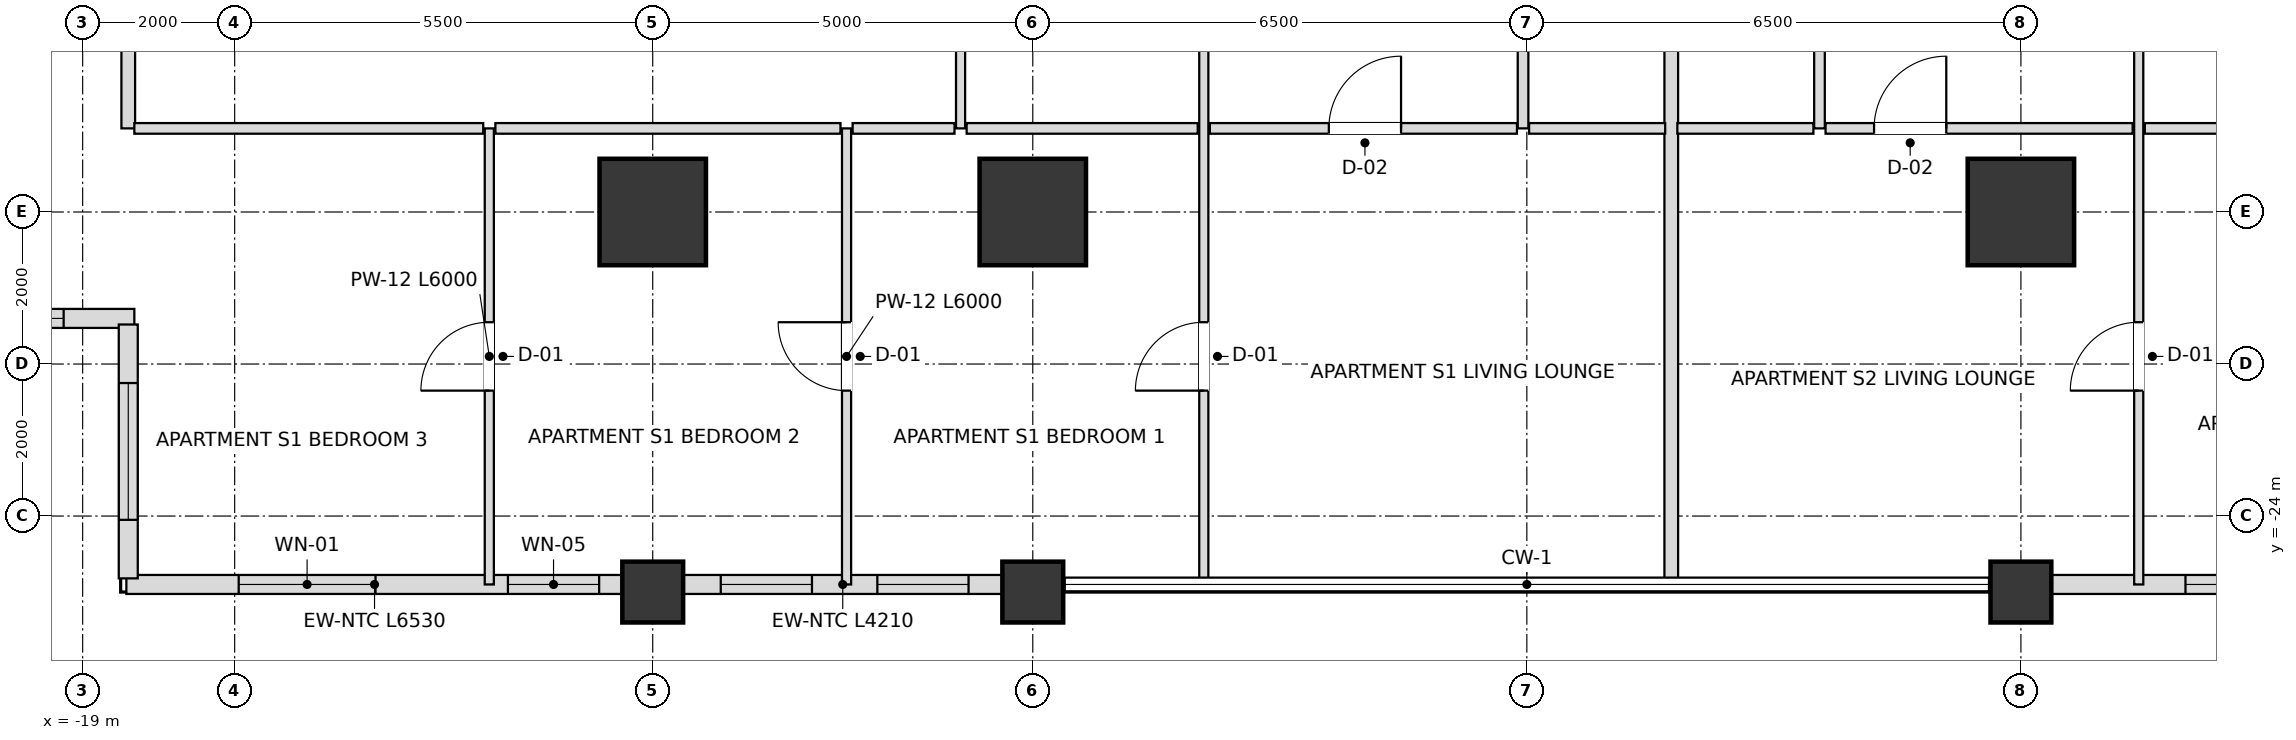
"""IFC4 building model, lengths in metres.
Left out: names, types, materials, properties, quantities, classifications, styles, units other than length and angle.
Written with IfcOpenShell. Run it as: python <this file> out.ifc"""

import sys

from ifc_helpers import new_model, si_unit, direction, frame, frame_2d, origin, origin_2d, place, context, subcontext, project, spatial, rectangle, extrude, element, fill, save


model = new_model("IFC4")
c1 = context("Model", 3, precision=1e-05, world=origin(), true_north=direction((0.0, 1.0)))
c2 = subcontext(c1, "Body", "Model", "MODEL_VIEW")
j1 = project(units=[si_unit("LENGTHUNIT", "METRE"), si_unit("PLANEANGLEUNIT", "RADIAN")], contexts=[c1])
p1 = place(None, origin())
s1 = spatial("IfcSite", under=j1, at=p1, CompositionType="ELEMENT")
p2 = place(p1, origin())
s2 = spatial("IfcBuilding", under=s1, at=p2, CompositionType="ELEMENT")
p3 = place(p2, frame((0.0, 0.0, 36.0)))
s3 = spatial("IfcBuildingStorey", under=s2, at=p3, CompositionType="ELEMENT", Elevation=36.0)
for number, where, z_axis, x_axis in (
    (1, (-11.5, -20.0, 0.0), (0.0, 0.0, 1.0), (1.0, 0.0, 0.0)),
    (2, (-6.5, -20.0, 0.0), (0.0, 0.0, 1.0), (1.0, 0.0, 0.0)),
    (3, (6.5, -20.0, 0.0), (0.0, 0.0, 1.0), (1.0, 0.0, 0.0)),
):
    element("IfcColumn", number, at=place(p3, frame(where, z_axis=z_axis, x_axis=x_axis)), inside=s3, PredefinedType="USERDEFINED", context=c2, shape_type="SweptSolid", body=[
        extrude(rectangle(XDim=1.4, YDim=1.4, at=origin_2d()), origin(), (0.0, 0.0, 1.0), 3.6),
    ])
for number, where, z_axis, x_axis in (
    (4, (-11.5, -25.0, 0.0), (0.0, 0.0, 1.0), (1.0, 0.0, 0.0)),
    (5, (-6.5, -25.0, 0.0), (0.0, 0.0, 1.0), (1.0, 0.0, 0.0)),
    (6, (6.5, -25.0, 0.0), (0.0, 0.0, 1.0), (1.0, 0.0, 0.0)),
):
    element("IfcColumn", number, at=place(p3, frame(where, z_axis=z_axis, x_axis=x_axis)), inside=s3, PredefinedType="COLUMN", context=c2, shape_type="SweptSolid", body=[
        extrude(rectangle(XDim=0.8, YDim=0.8, at=origin_2d()), origin(), (0.0, 0.0, 1.0), 3.6),
    ])
p4 = place(p3, frame((-18.425, -24.9, 0.0), z_axis=(0.0, 0.0, 1.0), x_axis=(1.0, 0.0, 0.0)))
e7 = element("IfcWall", 7, at=p4, inside=s3, PredefinedType="SOLIDWALL", context=c2, shape_type="SweptSolid", body=[
    extrude(rectangle(XDim=6.53, YDim=0.25, at=frame_2d((3.265, 0.0))), origin(), (0.0, 0.0, 1.0), 2.736),
])
p5 = place(p4, frame((1.478, 0.0, 0.72)))
e8 = element("IfcOpeningElement", 8, at=p5, cuts=e7, PredefinedType="OPENING", context=c2, shape_type="SweptSolid", body=[
    extrude(rectangle(XDim=1.8, YDim=1.68, at=frame_2d((0.9, 0.84))), frame((0.0, 0.135, 0.0), z_axis=(0.0, -1.0, 0.0), x_axis=(1.0, 0.0, 0.0)), (0.0, 0.0, 1.0), 0.27),
])
p6 = place(p4, frame((5.02, 0.0, 0.72)))
e9 = element("IfcOpeningElement", 9, at=p6, cuts=e7, PredefinedType="OPENING", context=c2, shape_type="SweptSolid", body=[
    extrude(rectangle(XDim=1.2, YDim=1.68, at=frame_2d((0.6, 0.84))), frame((0.0, 0.135, 0.0), z_axis=(0.0, -1.0, 0.0), x_axis=(1.0, 0.0, 0.0)), (0.0, 0.0, 1.0), 0.27),
])
p7 = place(p3, frame((-11.105, -24.9, 0.0), z_axis=(0.0, 0.0, 1.0), x_axis=(1.0, 0.0, 0.0)))
e10 = element("IfcWall", 10, at=p7, inside=s3, PredefinedType="SOLIDWALL", context=c2, shape_type="SweptSolid", body=[
    extrude(rectangle(XDim=4.21, YDim=0.25, at=frame_2d((2.105, 0.0))), origin(), (0.0, 0.0, 1.0), 2.736),
])
p8 = place(p7, frame((0.5, 0.0, 0.72)))
e11 = element("IfcOpeningElement", 11, at=p8, cuts=e10, PredefinedType="OPENING", context=c2, shape_type="SweptSolid", body=[
    extrude(rectangle(XDim=1.2, YDim=1.68, at=frame_2d((0.6, 0.84))), frame((0.0, 0.135, 0.0), z_axis=(0.0, -1.0, 0.0), x_axis=(1.0, 0.0, 0.0)), (0.0, 0.0, 1.0), 0.27),
])
p9 = place(p7, frame((2.56, 0.0, 0.72)))
e12 = element("IfcOpeningElement", 12, at=p9, cuts=e10, PredefinedType="OPENING", context=c2, shape_type="SweptSolid", body=[
    extrude(rectangle(XDim=1.2, YDim=1.68, at=frame_2d((0.6, 0.84))), frame((0.0, 0.135, 0.0), z_axis=(0.0, -1.0, 0.0), x_axis=(1.0, 0.0, 0.0)), (0.0, 0.0, 1.0), 0.27),
])
p10 = place(p3, frame((6.895, -24.9, 0.0), z_axis=(0.0, 0.0, 1.0), x_axis=(1.0, 0.0, 0.0)))
e13 = element("IfcWall", 13, at=p10, inside=s3, PredefinedType="SOLIDWALL", context=c2, shape_type="SweptSolid", body=[
    extrude(rectangle(XDim=4.21, YDim=0.25, at=frame_2d((2.105, 0.0))), origin(), (0.0, 0.0, 1.0), 2.736),
])
p11 = place(p10, frame((1.77, 0.0, 0.72)))
e14 = element("IfcOpeningElement", 14, at=p11, cuts=e13, PredefinedType="OPENING", context=c2, shape_type="SweptSolid", body=[
    extrude(rectangle(XDim=1.8, YDim=1.68, at=frame_2d((0.9, 0.84))), frame((0.0, 0.135, 0.0), z_axis=(0.0, -1.0, 0.0), x_axis=(1.0, 0.0, 0.0)), (0.0, 0.0, 1.0), 0.27),
])
p12 = place(p3, frame((-21.98, -21.4, 0.0), z_axis=(0.0, 0.0, 1.0), x_axis=(1.0, 0.0, 0.0)))
e15 = element("IfcWall", 15, at=p12, inside=s3, PredefinedType="SOLIDWALL", context=c2, shape_type="SweptSolid", body=[
    extrude(rectangle(XDim=3.66, YDim=0.25, at=frame_2d((1.83, 0.0))), origin(), (0.0, 0.0, 1.0), 2.736),
])
p13 = place(p12, frame((0.93, 0.0, 0.72)))
e16 = element("IfcOpeningElement", 16, at=p13, cuts=e15, PredefinedType="OPENING", context=c2, shape_type="SweptSolid", body=[
    extrude(rectangle(XDim=1.8, YDim=1.68, at=frame_2d((0.9, 0.84))), frame((0.0, 0.135, 0.0), z_axis=(0.0, -1.0, 0.0), x_axis=(1.0, 0.0, 0.0)), (0.0, 0.0, 1.0), 0.27),
])
p14 = place(p3, frame((-18.4, -21.48, 0.0), z_axis=(0.0, 0.0, 1.0), x_axis=(0.0, -1.0, 0.0)))
e17 = element("IfcWall", 17, at=p14, inside=s3, PredefinedType="SOLIDWALL", context=c2, shape_type="SweptSolid", body=[
    extrude(rectangle(XDim=3.34, YDim=0.25, at=frame_2d((1.67, 0.0))), origin(), (0.0, 0.0, 1.0), 2.736),
])
p15 = place(p14, frame((0.77, 0.0, 0.72)))
e18 = element("IfcOpeningElement", 18, at=p15, cuts=e17, PredefinedType="OPENING", context=c2, shape_type="SweptSolid", body=[
    extrude(rectangle(XDim=1.8, YDim=1.68, at=frame_2d((0.9, 0.84))), frame((0.0, 0.135, 0.0), z_axis=(0.0, -1.0, 0.0), x_axis=(1.0, 0.0, 0.0)), (0.0, 0.0, 1.0), 0.27),
])
p16 = place(p3, frame((-18.4, -18.9, 0.0), z_axis=(0.0, 0.0, 1.0), x_axis=(0.0, 1.0, 0.0)))
e19 = element("IfcWall", 19, at=p16, inside=s3, PredefinedType="PARTITIONING", context=c2, shape_type="SweptSolid", body=[
    extrude(rectangle(XDim=9.6, YDim=0.18, at=frame_2d((4.8, 0.0))), origin(), (0.0, 0.0, 1.0), 2.736),
])
p17 = place(p3, frame((-13.65, -24.9, 0.0), z_axis=(0.0, 0.0, 1.0), x_axis=(0.0, 1.0, 0.0)))
e20 = element("IfcWall", 20, at=p17, inside=s3, PredefinedType="PARTITIONING", context=c2, shape_type="SweptSolid", body=[
    extrude(rectangle(XDim=6.0, YDim=0.12, at=frame_2d((3.0, 0.0))), origin(), (0.0, 0.0, 1.0), 2.736),
])
p18 = place(p17, frame((2.55, 0.0, 0.0)))
e21 = element("IfcOpeningElement", 21, at=p18, cuts=e20, PredefinedType="OPENING", context=c2, shape_type="SweptSolid", body=[
    extrude(rectangle(XDim=0.9, YDim=2.1, at=frame_2d((0.45, 1.05))), frame((0.0, 0.07, 0.0), z_axis=(0.0, -1.0, 0.0), x_axis=(1.0, 0.0, 0.0)), (0.0, 0.0, 1.0), 0.14),
])
p19 = place(p3, frame((-8.95, -24.9, 0.0), z_axis=(0.0, 0.0, 1.0), x_axis=(0.0, 1.0, 0.0)))
e22 = element("IfcWall", 22, at=p19, inside=s3, PredefinedType="PARTITIONING", context=c2, shape_type="SweptSolid", body=[
    extrude(rectangle(XDim=6.0, YDim=0.12, at=frame_2d((3.0, 0.0))), origin(), (0.0, 0.0, 1.0), 2.816),
])
p20 = place(p19, frame((2.55, 0.0, 0.0)))
e23 = element("IfcOpeningElement", 23, at=p20, cuts=e22, PredefinedType="OPENING", context=c2, shape_type="SweptSolid", body=[
    extrude(rectangle(XDim=0.9, YDim=2.1, at=frame_2d((0.45, 1.05))), frame((0.0, 0.07, 0.0), z_axis=(0.0, -1.0, 0.0), x_axis=(1.0, 0.0, 0.0)), (0.0, 0.0, 1.0), 0.14),
])
p21 = place(p3, frame((-7.45, -18.9, 0.0), z_axis=(0.0, 0.0, 1.0), x_axis=(0.0, 1.0, 0.0)))
e24 = element("IfcWall", 24, at=p21, inside=s3, PredefinedType="PARTITIONING", context=c2, shape_type="SweptSolid", body=[
    extrude(rectangle(XDim=9.6, YDim=0.12, at=frame_2d((4.8, 0.0))), origin(), (0.0, 0.0, 1.0), 2.816),
])
p22 = place(p21, frame((4.35, 0.0, 0.0)))
e25 = element("IfcOpeningElement", 25, at=p22, cuts=e24, PredefinedType="OPENING", context=c2, shape_type="SweptSolid", body=[
    extrude(rectangle(XDim=0.9, YDim=2.1, at=frame_2d((0.45, 1.05))), frame((0.0, 0.07, 0.0), z_axis=(0.0, -1.0, 0.0), x_axis=(1.0, 0.0, 0.0)), (0.0, 0.0, 1.0), 0.14),
])
p23 = place(p3, frame((-4.25, -24.9, 0.0), z_axis=(0.0, 0.0, 1.0), x_axis=(0.0, 1.0, 0.0)))
e26 = element("IfcWall", 26, at=p23, inside=s3, PredefinedType="PARTITIONING", context=c2, shape_type="SweptSolid", body=[
    extrude(rectangle(XDim=15.6, YDim=0.12, at=frame_2d((7.8, 0.0))), origin(), (0.0, 0.0, 1.0), 2.816),
])
p24 = place(p23, frame((10.325, 0.0, 0.0)))
e27 = element("IfcOpeningElement", 27, at=p24, cuts=e26, PredefinedType="OPENING", context=c2, shape_type="SweptSolid", body=[
    extrude(rectangle(XDim=0.95, YDim=2.1, at=frame_2d((0.475, 1.05))), frame((0.0, 0.07, 0.0), z_axis=(0.0, -1.0, 0.0), x_axis=(1.0, 0.0, 0.0)), (0.0, 0.0, 1.0), 0.14),
])
p25 = place(p23, frame((2.55, 0.0, 0.0)))
e28 = element("IfcOpeningElement", 28, at=p25, cuts=e26, PredefinedType="OPENING", context=c2, shape_type="SweptSolid", body=[
    extrude(rectangle(XDim=0.9, YDim=2.1, at=frame_2d((0.45, 1.05))), frame((0.0, 0.07, 0.0), z_axis=(0.0, -1.0, 0.0), x_axis=(1.0, 0.0, 0.0)), (0.0, 0.0, 1.0), 0.14),
])
p26 = place(p3, frame((-0.05, -18.9, 0.0), z_axis=(0.0, 0.0, 1.0), x_axis=(0.0, 1.0, 0.0)))
e29 = element("IfcWall", 29, at=p26, inside=s3, PredefinedType="PARTITIONING", context=c2, shape_type="SweptSolid", body=[
    extrude(rectangle(XDim=9.6, YDim=0.14, at=frame_2d((4.8, 0.0))), origin(), (0.0, 0.0, 1.0), 2.948),
])
p27 = place(p26, frame((4.35, 0.0, 0.0)))
e30 = element("IfcOpeningElement", 30, at=p27, cuts=e29, PredefinedType="OPENING", context=c2, shape_type="SweptSolid", body=[
    extrude(rectangle(XDim=0.9, YDim=2.1, at=frame_2d((0.45, 1.05))), frame((0.0, 0.08, 0.0), z_axis=(0.0, -1.0, 0.0), x_axis=(1.0, 0.0, 0.0)), (0.0, 0.0, 1.0), 0.16),
])
p28 = place(p3, frame((1.9, -24.9, 0.0), z_axis=(0.0, 0.0, 1.0), x_axis=(0.0, 1.0, 0.0)))
e31 = element("IfcWall", 31, at=p28, inside=s3, PredefinedType="PARTITIONING", context=c2, shape_type="SweptSolid", body=[
    extrude(rectangle(XDim=15.6, YDim=0.18, at=frame_2d((7.8, 0.0))), origin(), (0.0, 0.0, 1.0), 2.816),
])
p29 = place(p3, frame((3.85, -18.9, 0.0), z_axis=(0.0, 0.0, 1.0), x_axis=(0.0, 1.0, 0.0)))
e32 = element("IfcWall", 32, at=p29, inside=s3, PredefinedType="PARTITIONING", context=c2, shape_type="SweptSolid", body=[
    extrude(rectangle(XDim=9.6, YDim=0.14, at=frame_2d((4.8, 0.0))), origin(), (0.0, 0.0, 1.0), 2.948),
])
p30 = place(p29, frame((4.35, 0.0, 0.0)))
e33 = element("IfcOpeningElement", 33, at=p30, cuts=e32, PredefinedType="OPENING", context=c2, shape_type="SweptSolid", body=[
    extrude(rectangle(XDim=0.9, YDim=2.1, at=frame_2d((0.45, 1.05))), frame((0.0, 0.08, 0.0), z_axis=(0.0, -1.0, 0.0), x_axis=(1.0, 0.0, 0.0)), (0.0, 0.0, 1.0), 0.16),
])
p31 = place(p3, frame((8.05, -24.9, 0.0), z_axis=(0.0, 0.0, 1.0), x_axis=(0.0, 1.0, 0.0)))
e34 = element("IfcWall", 34, at=p31, inside=s3, PredefinedType="PARTITIONING", context=c2, shape_type="SweptSolid", body=[
    extrude(rectangle(XDim=15.6, YDim=0.12, at=frame_2d((7.8, 0.0))), origin(), (0.0, 0.0, 1.0), 2.816),
])
p32 = place(p31, frame((10.325, 0.0, 0.0)))
e35 = element("IfcOpeningElement", 35, at=p32, cuts=e34, PredefinedType="OPENING", context=c2, shape_type="SweptSolid", body=[
    extrude(rectangle(XDim=0.95, YDim=2.1, at=frame_2d((0.475, 1.05))), frame((0.0, 0.07, 0.0), z_axis=(0.0, -1.0, 0.0), x_axis=(1.0, 0.0, 0.0)), (0.0, 0.0, 1.0), 0.14),
])
p33 = place(p31, frame((2.55, 0.0, 0.0)))
e36 = element("IfcOpeningElement", 36, at=p33, cuts=e34, PredefinedType="OPENING", context=c2, shape_type="SweptSolid", body=[
    extrude(rectangle(XDim=0.9, YDim=2.1, at=frame_2d((0.45, 1.05))), frame((0.0, 0.07, 0.0), z_axis=(0.0, -1.0, 0.0), x_axis=(1.0, 0.0, 0.0)), (0.0, 0.0, 1.0), 0.14),
])
p34 = place(p3, frame((-18.32, -18.9, 0.0), z_axis=(0.0, 0.0, 1.0), x_axis=(1.0, 0.0, 0.0)))
e37 = element("IfcWall", 37, at=p34, inside=s3, PredefinedType="PARTITIONING", context=c2, shape_type="SweptSolid", body=[
    extrude(rectangle(XDim=4.59, YDim=0.14, at=frame_2d((2.295, 0.0))), origin(), (0.0, 0.0, 1.0), 2.736),
])
p35 = place(p3, frame((-13.57, -18.9, 0.0), z_axis=(0.0, 0.0, 1.0), x_axis=(1.0, 0.0, 0.0)))
e38 = element("IfcWall", 38, at=p35, inside=s3, PredefinedType="PARTITIONING", context=c2, shape_type="SweptSolid", body=[
    extrude(rectangle(XDim=4.54, YDim=0.14, at=frame_2d((2.27, 0.0))), origin(), (0.0, 0.0, 1.0), 2.736),
])
p36 = place(p3, frame((-8.87, -18.9, 0.0), z_axis=(0.0, 0.0, 1.0), x_axis=(1.0, 0.0, 0.0)))
e39 = element("IfcWall", 39, at=p36, inside=s3, PredefinedType="PARTITIONING", context=c2, shape_type="SweptSolid", body=[
    extrude(rectangle(XDim=1.34, YDim=0.14, at=frame_2d((0.67, 0.0))), origin(), (0.0, 0.0, 1.0), 3.38),
])
p37 = place(p3, frame((-7.37, -18.9, 0.0), z_axis=(0.0, 0.0, 1.0), x_axis=(1.0, 0.0, 0.0)))
e40 = element("IfcWall", 40, at=p37, inside=s3, PredefinedType="PARTITIONING", context=c2, shape_type="SweptSolid", body=[
    extrude(rectangle(XDim=3.04, YDim=0.14, at=frame_2d((1.52, 0.0))), origin(), (0.0, 0.0, 1.0), 2.816),
])
p38 = place(p3, frame((-4.17, -18.9, 0.0), z_axis=(0.0, 0.0, 1.0), x_axis=(1.0, 0.0, 0.0)))
e41 = element("IfcWall", 41, at=p38, inside=s3, PredefinedType="PARTITIONING", context=c2, shape_type="SweptSolid", body=[
    extrude(rectangle(XDim=4.04, YDim=0.14, at=frame_2d((2.02, 0.0))), origin(), (0.0, 0.0, 1.0), 3.38),
])
p39 = place(p38, frame((1.565, 0.0, 0.0)))
e42 = element("IfcOpeningElement", 42, at=p39, cuts=e41, PredefinedType="OPENING", context=c2, shape_type="SweptSolid", body=[
    extrude(rectangle(XDim=0.95, YDim=2.1, at=frame_2d((0.475, 1.05))), frame((0.0, 0.08, 0.0), z_axis=(0.0, -1.0, 0.0), x_axis=(1.0, 0.0, 0.0)), (0.0, 0.0, 1.0), 0.16),
])
for number, where, z_axis, x_axis in (
    (43, (0.03, -18.9, 0.0), (0.0, 0.0, 1.0), (1.0, 0.0, 0.0)),
    (44, (1.98, -18.9, 0.0), (0.0, 0.0, 1.0), (1.0, 0.0, 0.0)),
):
    element("IfcWall", number, at=place(p3, frame(where, z_axis=z_axis, x_axis=x_axis)), inside=s3, PredefinedType="PARTITIONING", context=c2, shape_type="SweptSolid", body=[
        extrude(rectangle(XDim=1.79, YDim=0.14, at=frame_2d((0.895, 0.0))), origin(), (0.0, 0.0, 1.0), 3.38),
    ])
p40 = place(p3, frame((3.93, -18.9, 0.0), z_axis=(0.0, 0.0, 1.0), x_axis=(1.0, 0.0, 0.0)))
e45 = element("IfcWall", 45, at=p40, inside=s3, PredefinedType="PARTITIONING", context=c2, shape_type="SweptSolid", body=[
    extrude(rectangle(XDim=4.04, YDim=0.14, at=frame_2d((2.02, 0.0))), origin(), (0.0, 0.0, 1.0), 2.816),
])
p41 = place(p40, frame((0.638, 0.0, 0.0)))
e46 = element("IfcOpeningElement", 46, at=p41, cuts=e45, PredefinedType="OPENING", context=c2, shape_type="SweptSolid", body=[
    extrude(rectangle(XDim=0.95, YDim=2.1, at=frame_2d((0.475, 1.05))), frame((0.0, 0.08, 0.0), z_axis=(0.0, -1.0, 0.0), x_axis=(1.0, 0.0, 0.0)), (0.0, 0.0, 1.0), 0.16),
])
p42 = place(p3, frame((8.13, -18.9, 0.0), z_axis=(0.0, 0.0, 1.0), x_axis=(1.0, 0.0, 0.0)))
e47 = element("IfcWall", 47, at=p42, inside=s3, PredefinedType="PARTITIONING", context=c2, shape_type="SweptSolid", body=[
    extrude(rectangle(XDim=3.04, YDim=0.14, at=frame_2d((1.52, 0.0))), origin(), (0.0, 0.0, 1.0), 3.38),
])
p43 = place(p5, origin())
e48 = element("IfcWindow", 48, at=p43, inside=s3, PartitioningType="SINGLE_PANEL", PredefinedType="WINDOW", context=c2, shape_type="SweptSolid", body=[
    extrude(rectangle(XDim=1.8, YDim=1.68, at=frame_2d((0.9, 0.84))), frame((0.0, 0.03, 0.0), z_axis=(0.0, -1.0, 0.0), x_axis=(1.0, 0.0, 0.0)), (0.0, 0.0, 1.0), 0.06),
])
fill(e8, e48)
p44 = place(p6, origin())
e49 = element("IfcWindow", 49, at=p44, inside=s3, PartitioningType="SINGLE_PANEL", PredefinedType="WINDOW", context=c2, shape_type="SweptSolid", body=[
    extrude(rectangle(XDim=1.2, YDim=1.68, at=frame_2d((0.6, 0.84))), frame((0.0, 0.03, 0.0), z_axis=(0.0, -1.0, 0.0), x_axis=(1.0, 0.0, 0.0)), (0.0, 0.0, 1.0), 0.06),
])
fill(e9, e49)
p45 = place(p8, origin())
e50 = element("IfcWindow", 50, at=p45, inside=s3, PartitioningType="SINGLE_PANEL", PredefinedType="WINDOW", context=c2, shape_type="SweptSolid", body=[
    extrude(rectangle(XDim=1.2, YDim=1.68, at=frame_2d((0.6, 0.84))), frame((0.0, 0.03, 0.0), z_axis=(0.0, -1.0, 0.0), x_axis=(1.0, 0.0, 0.0)), (0.0, 0.0, 1.0), 0.06),
])
fill(e11, e50)
p46 = place(p9, origin())
e51 = element("IfcWindow", 51, at=p46, inside=s3, PartitioningType="SINGLE_PANEL", PredefinedType="WINDOW", context=c2, shape_type="SweptSolid", body=[
    extrude(rectangle(XDim=1.2, YDim=1.68, at=frame_2d((0.6, 0.84))), frame((0.0, 0.03, 0.0), z_axis=(0.0, -1.0, 0.0), x_axis=(1.0, 0.0, 0.0)), (0.0, 0.0, 1.0), 0.06),
])
fill(e12, e51)
p47 = place(p11, origin())
e52 = element("IfcWindow", 52, at=p47, inside=s3, PartitioningType="SINGLE_PANEL", PredefinedType="WINDOW", context=c2, shape_type="SweptSolid", body=[
    extrude(rectangle(XDim=1.8, YDim=1.68, at=frame_2d((0.9, 0.84))), frame((0.0, 0.03, 0.0), z_axis=(0.0, -1.0, 0.0), x_axis=(1.0, 0.0, 0.0)), (0.0, 0.0, 1.0), 0.06),
])
fill(e14, e52)
p48 = place(p13, origin())
e53 = element("IfcWindow", 53, at=p48, inside=s3, PartitioningType="SINGLE_PANEL", PredefinedType="WINDOW", context=c2, shape_type="SweptSolid", body=[
    extrude(rectangle(XDim=1.8, YDim=1.68, at=frame_2d((0.9, 0.84))), frame((0.0, 0.03, 0.0), z_axis=(0.0, -1.0, 0.0), x_axis=(1.0, 0.0, 0.0)), (0.0, 0.0, 1.0), 0.06),
])
fill(e16, e53)
p49 = place(p15, origin())
e54 = element("IfcWindow", 54, at=p49, inside=s3, PartitioningType="SINGLE_PANEL", PredefinedType="WINDOW", context=c2, shape_type="SweptSolid", body=[
    extrude(rectangle(XDim=1.8, YDim=1.68, at=frame_2d((0.9, 0.84))), frame((0.0, 0.03, 0.0), z_axis=(0.0, -1.0, 0.0), x_axis=(1.0, 0.0, 0.0)), (0.0, 0.0, 1.0), 0.06),
])
fill(e18, e54)
p50 = place(p39, origin())
e55 = element("IfcDoor", 55, at=p50, inside=s3, OperationType="SINGLE_SWING_RIGHT", PredefinedType="DOOR", context=c2, shape_type="SweptSolid", body=[
    extrude(rectangle(XDim=0.95, YDim=2.1, at=frame_2d((0.475, 1.05))), frame((0.0, 0.025, 0.0), z_axis=(0.0, -1.0, 0.0), x_axis=(1.0, 0.0, 0.0)), (0.0, 0.0, 1.0), 0.05),
])
fill(e42, e55)
p51 = place(p25, origin())
e56 = element("IfcDoor", 56, at=p51, inside=s3, OperationType="SINGLE_SWING_LEFT", PredefinedType="DOOR", context=c2, shape_type="SweptSolid", body=[
    extrude(rectangle(XDim=0.9, YDim=2.1, at=frame_2d((0.45, 1.05))), frame((0.0, 0.025, 0.0), z_axis=(0.0, -1.0, 0.0), x_axis=(1.0, 0.0, 0.0)), (0.0, 0.0, 1.0), 0.05),
])
fill(e28, e56)
p52 = place(p20, origin())
e57 = element("IfcDoor", 57, at=p52, inside=s3, OperationType="SINGLE_SWING_RIGHT", PredefinedType="DOOR", context=c2, shape_type="SweptSolid", body=[
    extrude(rectangle(XDim=0.9, YDim=2.1, at=frame_2d((0.45, 1.05))), frame((0.0, 0.025, 0.0), z_axis=(0.0, -1.0, 0.0), x_axis=(1.0, 0.0, 0.0)), (0.0, 0.0, 1.0), 0.05),
])
fill(e23, e57)
p53 = place(p18, origin())
e58 = element("IfcDoor", 58, at=p53, inside=s3, OperationType="SINGLE_SWING_LEFT", PredefinedType="DOOR", context=c2, shape_type="SweptSolid", body=[
    extrude(rectangle(XDim=0.9, YDim=2.1, at=frame_2d((0.45, 1.05))), frame((0.0, 0.025, 0.0), z_axis=(0.0, -1.0, 0.0), x_axis=(1.0, 0.0, 0.0)), (0.0, 0.0, 1.0), 0.05),
])
fill(e21, e58)
p54 = place(p41, origin())
e59 = element("IfcDoor", 59, at=p54, inside=s3, OperationType="SINGLE_SWING_RIGHT", PredefinedType="DOOR", context=c2, shape_type="SweptSolid", body=[
    extrude(rectangle(XDim=0.95, YDim=2.1, at=frame_2d((0.475, 1.05))), frame((0.0, 0.025, 0.0), z_axis=(0.0, -1.0, 0.0), x_axis=(1.0, 0.0, 0.0)), (0.0, 0.0, 1.0), 0.05),
])
fill(e46, e59)
p55 = place(p33, origin())
e60 = element("IfcDoor", 60, at=p55, inside=s3, OperationType="SINGLE_SWING_LEFT", PredefinedType="DOOR", context=c2, shape_type="SweptSolid", body=[
    extrude(rectangle(XDim=0.9, YDim=2.1, at=frame_2d((0.45, 1.05))), frame((0.0, 0.025, 0.0), z_axis=(0.0, -1.0, 0.0), x_axis=(1.0, 0.0, 0.0)), (0.0, 0.0, 1.0), 0.05),
])
fill(e36, e60)
save(model, sys.argv[1])
